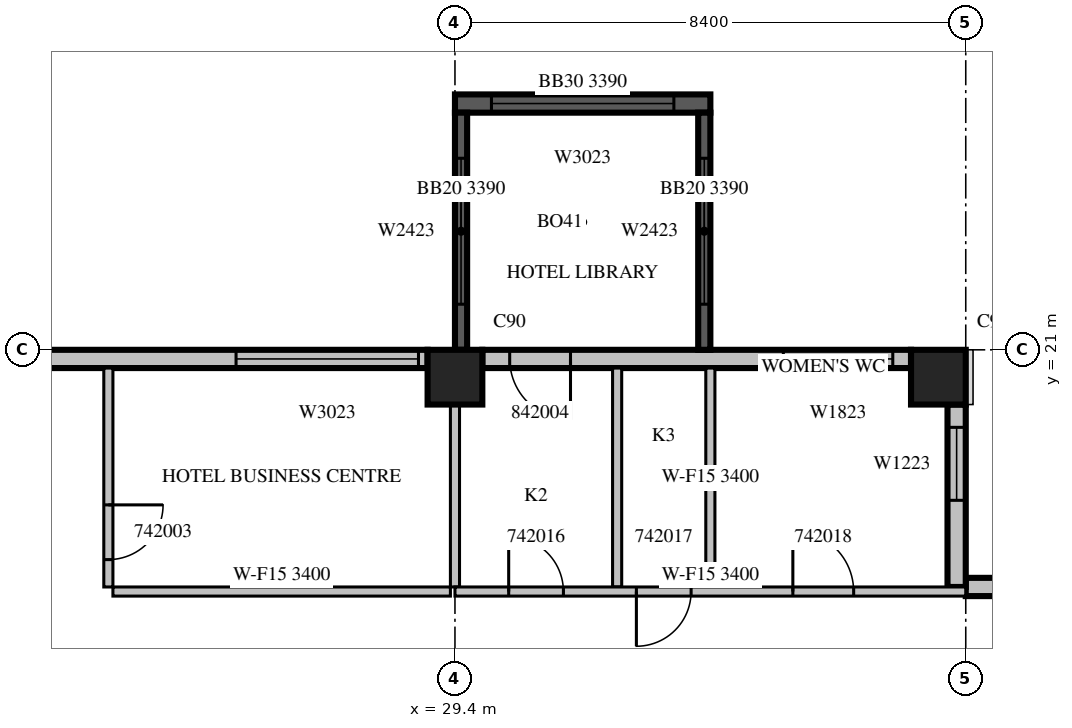
"""IFC4 building model, lengths in metres.
Left out: names, types, materials, properties, quantities, classifications, styles, units other than length and angle.
Written with IfcOpenShell. Run it as: python <this file> out.ifc"""

import sys

from ifc_helpers import new_model, si_unit, direction, frame, frame_2d, origin, origin_2d, place, context, subcontext, project, spatial, rectangle, extrude, source, transform, mapped, element, fill, save


model = new_model("IFC4")
c1 = context("Model", 3, precision=1e-05, world=origin(), true_north=direction((0.0, 1.0)))
c2 = subcontext(c1, "Body", "Model", "MODEL_VIEW")
j1 = project(units=[si_unit("LENGTHUNIT", "METRE"), si_unit("PLANEANGLEUNIT", "RADIAN")], contexts=[c1])
p1 = place(None, origin())
s1 = spatial("IfcSite", under=j1, at=p1, CompositionType="ELEMENT")
p2 = place(p1, origin())
s2 = spatial("IfcBuilding", under=s1, at=p2, CompositionType="ELEMENT")
p3 = place(p2, frame((0.0, 0.0, 193.0)))
s3 = spatial("IfcBuildingStorey", under=s2, at=p3, CompositionType="ELEMENT", Elevation=193.0)
m1 = source(origin(), c2, "Body", "SweptSolid", [
    extrude(rectangle(XDim=0.9, YDim=0.9, at=origin_2d()), origin(), (0.0, 0.0, 1.0), 3.8),
])
for number, where, z_axis, x_axis in (
    (1, (29.4, 20.55, 0.0), (0.0, 0.0, 1.0), (1.0, 0.0, 0.0)),
    (2, (37.35, 20.55, 0.0), (0.0, 0.0, 1.0), (1.0, 0.0, 0.0)),
):
    element("IfcColumn", number, at=place(p3, frame(where, z_axis=z_axis, x_axis=x_axis)), inside=s3, PredefinedType="COLUMN", context=c2, shape_type="MappedRepresentation", body=[
        mapped(m1, transform((0.0, 0.0, 0.0), scale=1.0)),
    ])
m2 = source(origin(), c2, "Body", "SweptSolid", [
    extrude(rectangle(XDim=21.84, YDim=0.3, at=frame_2d((10.92, 0.0))), origin(), (0.0, 0.0, 1.0), 3.4),
])
p4 = place(p3, frame((59.64, 17.1, 0.0), z_axis=(0.0, 0.0, 1.0), x_axis=(-1.0, 0.0, 0.0)))
e3 = element("IfcWall", 3, at=p4, inside=s3, PredefinedType="STANDARD", context=c2, shape_type="MappedRepresentation", body=[
    mapped(m2, transform((0.0, 0.0, 0.0), scale=1.0)),
])
m3 = source(origin(), c2, "Body", "SweptSolid", [
    extrude(rectangle(XDim=3.0, YDim=2.3, at=frame_2d((1.5, 1.15))), frame((0.0, 0.16, 0.0), z_axis=(0.0, -1.0, 0.0), x_axis=(1.0, 0.0, 0.0)), (0.0, 0.0, 1.0), 0.32),
])
p5 = place(p4, frame((0.6, 0.0, 0.6)))
e4 = element("IfcOpeningElement", 4, at=p5, cuts=e3, PredefinedType="OPENING", context=c2, shape_type="MappedRepresentation", body=[
    mapped(m3, transform((0.0, 0.0, 0.0), scale=1.0)),
])
p6 = place(p4, frame((4.8, 0.0, 0.6)))
e5 = element("IfcOpeningElement", 5, at=p6, cuts=e3, PredefinedType="OPENING", context=c2, shape_type="MappedRepresentation", body=[
    mapped(m3, transform((0.0, 0.0, 0.0), scale=1.0)),
])
m4 = source(origin(), c2, "Body", "SweptSolid", [
    extrude(rectangle(XDim=3.6, YDim=2.3, at=frame_2d((1.8, 1.15))), frame((0.0, 0.16, 0.0), z_axis=(0.0, -1.0, 0.0), x_axis=(1.0, 0.0, 0.0)), (0.0, 0.0, 1.0), 0.32),
])
p7 = place(p4, frame((9.54, 0.0, 0.6)))
e6 = element("IfcOpeningElement", 6, at=p7, cuts=e3, PredefinedType="OPENING", context=c2, shape_type="MappedRepresentation", body=[
    mapped(m4, transform((0.0, 0.0, 0.0), scale=1.0)),
])
p8 = place(p4, frame((15.42, 0.0, 0.6)))
e7 = element("IfcOpeningElement", 7, at=p8, cuts=e3, PredefinedType="OPENING", context=c2, shape_type="MappedRepresentation", body=[
    mapped(m4, transform((0.0, 0.0, 0.0), scale=1.0)),
])
m5 = source(origin(), c2, "Body", "SweptSolid", [
    extrude(rectangle(XDim=3.0, YDim=0.3, at=frame_2d((1.5, 0.0))), origin(), (0.0, 0.0, 1.0), 3.4),
])
p9 = place(p3, frame((37.65, 17.1, 0.0), z_axis=(0.0, 0.0, 1.0), x_axis=(0.0, 1.0, 0.0)))
e8 = element("IfcWall", 8, at=p9, inside=s3, PredefinedType="STANDARD", context=c2, shape_type="MappedRepresentation", body=[
    mapped(m5, transform((0.0, 0.0, 0.0), scale=1.0)),
])
m6 = source(origin(), c2, "Body", "SweptSolid", [
    extrude(rectangle(XDim=1.2, YDim=2.3, at=frame_2d((0.6, 1.15))), frame((0.0, 0.16, 0.0), z_axis=(0.0, -1.0, 0.0), x_axis=(1.0, 0.0, 0.0)), (0.0, 0.0, 1.0), 0.32),
])
p10 = place(p9, frame((1.425, 0.0, 0.6)))
e9 = element("IfcOpeningElement", 9, at=p10, cuts=e8, PredefinedType="OPENING", context=c2, shape_type="MappedRepresentation", body=[
    mapped(m6, transform((0.0, 0.0, 0.0), scale=1.0)),
])
m7 = source(origin(), c2, "Body", "SweptSolid", [
    extrude(rectangle(XDim=7.05, YDim=0.3, at=frame_2d((3.525, 0.0))), origin(), (0.0, 0.0, 1.0), 3.4),
])
p11 = place(p3, frame((36.9, 20.85, 0.0), z_axis=(0.0, 0.0, 1.0), x_axis=(-1.0, 0.0, 0.0)))
e10 = element("IfcWall", 10, at=p11, inside=s3, PredefinedType="STANDARD", context=c2, shape_type="MappedRepresentation", body=[
    mapped(m7, transform((0.0, 0.0, 0.0), scale=1.0)),
])
m8 = source(origin(), c2, "Body", "SweptSolid", [
    extrude(rectangle(XDim=1.8, YDim=2.3, at=frame_2d((0.9, 1.15))), frame((0.0, 0.16, 0.0), z_axis=(0.0, -1.0, 0.0), x_axis=(1.0, 0.0, 0.0)), (0.0, 0.0, 1.0), 0.32),
])
p12 = place(p11, frame((0.3, 0.0, 0.6)))
e11 = element("IfcOpeningElement", 11, at=p12, cuts=e10, PredefinedType="OPENING", context=c2, shape_type="MappedRepresentation", body=[
    mapped(m8, transform((0.0, 0.0, 0.0), scale=1.0)),
])
m9 = source(origin(), c2, "Body", "SweptSolid", [
    extrude(rectangle(XDim=1.0, YDim=2.1, at=frame_2d((0.5, 1.05))), frame((0.0, 0.16, 0.0), z_axis=(0.0, -1.0, 0.0), x_axis=(1.0, 0.0, 0.0)), (0.0, 0.0, 1.0), 0.32),
])
p13 = place(p11, frame((5.6, 0.0, 0.0)))
e12 = element("IfcOpeningElement", 12, at=p13, cuts=e10, PredefinedType="OPENING", context=c2, shape_type="MappedRepresentation", body=[
    mapped(m9, transform((0.0, 0.0, 0.0), scale=1.0)),
])
m10 = source(origin(), c2, "Body", "SweptSolid", [
    extrude(rectangle(XDim=7.15, YDim=0.3, at=frame_2d((3.575, 0.0))), origin(), (0.0, 0.0, 1.0), 3.4),
])
p14 = place(p3, frame((28.95, 20.85, 0.0), z_axis=(0.0, 0.0, 1.0), x_axis=(-1.0, 0.0, 0.0)))
e13 = element("IfcWall", 13, at=p14, inside=s3, PredefinedType="STANDARD", context=c2, shape_type="MappedRepresentation", body=[
    mapped(m10, transform((0.0, 0.0, 0.0), scale=1.0)),
])
p15 = place(p14, frame((0.15, 0.0, 0.6)))
e14 = element("IfcOpeningElement", 14, at=p15, cuts=e13, PredefinedType="OPENING", context=c2, shape_type="MappedRepresentation", body=[
    mapped(m3, transform((0.0, 0.0, 0.0), scale=1.0)),
])
m11 = source(origin(), c2, "Body", "SweptSolid", [
    extrude(rectangle(XDim=4.2, YDim=0.3, at=frame_2d((2.1, 0.0))), origin(), (0.0, 0.0, 1.0), 3.39),
])
p16 = place(p3, frame((33.6, 25.05, 0.0), z_axis=(0.0, 0.0, 1.0), x_axis=(-1.0, 0.0, 0.0)))
e15 = element("IfcWall", 15, at=p16, inside=s3, PredefinedType="SOLIDWALL", context=c2, shape_type="MappedRepresentation", body=[
    mapped(m11, transform((0.0, 0.0, 0.0), scale=1.0)),
])
p17 = place(p16, frame((0.6, 0.0, 0.6)))
e16 = element("IfcOpeningElement", 16, at=p17, cuts=e15, PredefinedType="OPENING", context=c2, shape_type="MappedRepresentation", body=[
    mapped(m3, transform((0.0, 0.0, 0.0), scale=1.0)),
])
m12 = source(origin(), c2, "Body", "SweptSolid", [
    extrude(rectangle(XDim=3.9, YDim=0.2, at=frame_2d((1.95, 0.0))), origin(), (0.0, 0.0, 1.0), 3.39),
])
p18 = place(p3, frame((33.5, 21.0, 0.0), z_axis=(0.0, 0.0, 1.0), x_axis=(0.0, 1.0, 0.0)))
e17 = element("IfcWall", 17, at=p18, inside=s3, PredefinedType="SOLIDWALL", context=c2, shape_type="MappedRepresentation", body=[
    mapped(m12, transform((0.0, 0.0, 0.0), scale=1.0)),
])
m13 = source(origin(), c2, "Body", "SweptSolid", [
    extrude(rectangle(XDim=2.4, YDim=2.3, at=frame_2d((1.2, 1.15))), frame((0.0, 0.11, 0.0), z_axis=(0.0, -1.0, 0.0), x_axis=(1.0, 0.0, 0.0)), (0.0, 0.0, 1.0), 0.22),
])
p19 = place(p18, frame((0.75, 0.0, 0.6)))
e18 = element("IfcOpeningElement", 18, at=p19, cuts=e17, PredefinedType="OPENING", context=c2, shape_type="MappedRepresentation", body=[
    mapped(m13, transform((0.0, 0.0, 0.0), scale=1.0)),
])
p20 = place(p3, frame((29.5, 21.0, 0.0), z_axis=(0.0, 0.0, 1.0), x_axis=(0.0, 1.0, 0.0)))
e19 = element("IfcWall", 19, at=p20, inside=s3, PredefinedType="SOLIDWALL", context=c2, shape_type="MappedRepresentation", body=[
    mapped(m12, transform((0.0, 0.0, 0.0), scale=1.0)),
])
p21 = place(p20, frame((0.75, 0.0, 0.6)))
e20 = element("IfcOpeningElement", 20, at=p21, cuts=e19, PredefinedType="OPENING", context=c2, shape_type="MappedRepresentation", body=[
    mapped(m13, transform((0.0, 0.0, 0.0), scale=1.0)),
])
m14 = source(origin(), c2, "Body", "SweptSolid", [
    extrude(rectangle(XDim=3.6, YDim=0.15, at=frame_2d((1.8, 0.0))), origin(), (0.0, 0.0, 1.0), 3.4),
])
p22 = place(p3, frame((23.7, 20.7, 0.0), z_axis=(0.0, 0.0, 1.0), x_axis=(0.0, -1.0, 0.0)))
e21 = element("IfcWall", 21, at=p22, inside=s3, PredefinedType="PARTITIONING", context=c2, shape_type="MappedRepresentation", body=[
    mapped(m14, transform((0.0, 0.0, 0.0), scale=1.0)),
])
m15 = source(origin(), c2, "Body", "SweptSolid", [
    extrude(rectangle(XDim=0.9, YDim=2.1, at=frame_2d((0.45, 1.05))), frame((0.0, 0.085, 0.0), z_axis=(0.0, -1.0, 0.0), x_axis=(1.0, 0.0, 0.0)), (0.0, 0.0, 1.0), 0.17),
])
p23 = place(p22, frame((2.25, 0.0, 0.0)))
e22 = element("IfcOpeningElement", 22, at=p23, cuts=e21, PredefinedType="OPENING", context=c2, shape_type="MappedRepresentation", body=[
    mapped(m15, transform((0.0, 0.0, 0.0), scale=1.0)),
])
m16 = source(origin(), c2, "Body", "SweptSolid", [
    extrude(rectangle(XDim=5.55, YDim=0.15, at=frame_2d((2.775, 0.0))), origin(), (0.0, 0.0, 1.0), 3.4),
])
p24 = place(p3, frame((23.775, 17.025, 0.0), z_axis=(0.0, 0.0, 1.0), x_axis=(1.0, 0.0, 0.0)))
e23 = element("IfcWall", 23, at=p24, inside=s3, PredefinedType="PARTITIONING", context=c2, shape_type="MappedRepresentation", body=[
    mapped(m16, transform((0.0, 0.0, 0.0), scale=1.0)),
])
m17 = source(origin(), c2, "Body", "SweptSolid", [
    extrude(rectangle(XDim=3.001, YDim=0.15, at=frame_2d((1.5, 0.0))), origin(), (0.0, 0.0, 1.0), 3.4),
])
p25 = place(p3, frame((29.4, 17.1, 0.0), z_axis=(0.0, 0.0, 1.0), x_axis=(0.0, 1.0, 0.0)))
e24 = element("IfcWall", 24, at=p25, inside=s3, PredefinedType="PARTITIONING", context=c2, shape_type="MappedRepresentation", body=[
    mapped(m17, transform((0.0, 0.0, 0.0), scale=1.0)),
])
for number, where, z_axis, x_axis in (
    (25, (32.067, 20.7, 0.0), (0.0, 0.0, 1.0), (0.0, -1.0, 0.0)),
    (26, (33.6, 17.1, 0.0), (0.0, 0.0, 1.0), (0.0, 1.0, 0.0)),
):
    element("IfcWall", number, at=place(p3, frame(where, z_axis=z_axis, x_axis=x_axis)), inside=s3, PredefinedType="PARTITIONING", context=c2, shape_type="MappedRepresentation", body=[
        mapped(m14, transform((0.0, 0.0, 0.0), scale=1.0)),
    ])
m18 = source(origin(), c2, "Body", "SweptSolid", [
    extrude(rectangle(XDim=8.4, YDim=0.15, at=frame_2d((4.2, 0.0))), origin(), (0.0, 0.0, 1.0), 3.4),
])
p26 = place(p3, frame((29.4, 17.025, 0.0), z_axis=(0.0, 0.0, 1.0), x_axis=(1.0, 0.0, 0.0)))
e27 = element("IfcWall", 27, at=p26, inside=s3, PredefinedType="PARTITIONING", context=c2, shape_type="MappedRepresentation", body=[
    mapped(m18, transform((0.0, 0.0, 0.0), scale=1.0)),
])
p27 = place(p26, frame((0.883, 0.0, 0.0)))
e28 = element("IfcOpeningElement", 28, at=p27, cuts=e27, PredefinedType="OPENING", context=c2, shape_type="MappedRepresentation", body=[
    mapped(m15, transform((0.0, 0.0, 0.0), scale=1.0)),
])
p28 = place(p26, frame((2.983, 0.0, 0.0)))
e29 = element("IfcOpeningElement", 29, at=p28, cuts=e27, PredefinedType="OPENING", context=c2, shape_type="MappedRepresentation", body=[
    mapped(m15, transform((0.0, 0.0, 0.0), scale=1.0)),
])
m19 = source(origin(), c2, "Body", "SweptSolid", [
    extrude(rectangle(XDim=1.0, YDim=2.1, at=frame_2d((0.5, 1.05))), frame((0.0, 0.085, 0.0), z_axis=(0.0, -1.0, 0.0), x_axis=(1.0, 0.0, 0.0)), (0.0, 0.0, 1.0), 0.17),
])
p29 = place(p26, frame((5.557, 0.0, 0.0)))
e30 = element("IfcOpeningElement", 30, at=p29, cuts=e27, PredefinedType="OPENING", context=c2, shape_type="MappedRepresentation", body=[
    mapped(m19, transform((0.0, 0.0, 0.0), scale=1.0)),
])
m20 = source(origin(), c2, "Body", "SweptSolid", [
    extrude(rectangle(XDim=1.2, YDim=2.3, at=frame_2d((0.6, 1.15))), frame((0.0, 0.03, 0.0), z_axis=(0.0, -1.0, 0.0), x_axis=(1.0, 0.0, 0.0)), (0.0, 0.0, 1.0), 0.06),
])
p30 = place(p10, origin())
e31 = element("IfcWindow", 31, at=p30, inside=s3, PartitioningType="SINGLE_PANEL", PredefinedType="WINDOW", context=c2, shape_type="MappedRepresentation", body=[
    mapped(m20, transform((0.0, 0.0, 0.0), scale=1.0)),
])
fill(e9, e31)
m21 = source(origin(), c2, "Body", "SweptSolid", [
    extrude(rectangle(XDim=1.8, YDim=2.3, at=frame_2d((0.9, 1.15))), frame((0.0, 0.03, 0.0), z_axis=(0.0, -1.0, 0.0), x_axis=(1.0, 0.0, 0.0)), (0.0, 0.0, 1.0), 0.06),
])
p31 = place(p12, origin())
e32 = element("IfcWindow", 32, at=p31, inside=s3, PartitioningType="SINGLE_PANEL", PredefinedType="WINDOW", context=c2, shape_type="MappedRepresentation", body=[
    mapped(m21, transform((0.0, 0.0, 0.0), scale=1.0)),
])
fill(e11, e32)
m22 = source(origin(), c2, "Body", "SweptSolid", [
    extrude(rectangle(XDim=3.0, YDim=2.3, at=frame_2d((1.5, 1.15))), frame((0.0, 0.03, 0.0), z_axis=(0.0, -1.0, 0.0), x_axis=(1.0, 0.0, 0.0)), (0.0, 0.0, 1.0), 0.06),
])
p32 = place(p15, origin())
e33 = element("IfcWindow", 33, at=p32, inside=s3, PartitioningType="SINGLE_PANEL", PredefinedType="WINDOW", context=c2, shape_type="MappedRepresentation", body=[
    mapped(m22, transform((0.0, 0.0, 0.0), scale=1.0)),
])
fill(e14, e33)
p33 = place(p17, origin())
e34 = element("IfcWindow", 34, at=p33, inside=s3, PartitioningType="SINGLE_PANEL", PredefinedType="WINDOW", context=c2, shape_type="MappedRepresentation", body=[
    mapped(m22, transform((0.0, 0.0, 0.0), scale=1.0)),
])
fill(e16, e34)
m23 = source(origin(), c2, "Body", "SweptSolid", [
    extrude(rectangle(XDim=2.4, YDim=2.3, at=frame_2d((1.2, 1.15))), frame((0.0, 0.03, 0.0), z_axis=(0.0, -1.0, 0.0), x_axis=(1.0, 0.0, 0.0)), (0.0, 0.0, 1.0), 0.06),
])
p34 = place(p19, origin())
e35 = element("IfcWindow", 35, at=p34, inside=s3, PartitioningType="SINGLE_PANEL", PredefinedType="WINDOW", context=c2, shape_type="MappedRepresentation", body=[
    mapped(m23, transform((0.0, 0.0, 0.0), scale=1.0)),
])
fill(e18, e35)
p35 = place(p21, origin())
e36 = element("IfcWindow", 36, at=p35, inside=s3, PartitioningType="SINGLE_PANEL", PredefinedType="WINDOW", context=c2, shape_type="MappedRepresentation", body=[
    mapped(m23, transform((0.0, 0.0, 0.0), scale=1.0)),
])
fill(e20, e36)
m24 = source(origin(), c2, "Body", "SweptSolid", [
    extrude(rectangle(XDim=0.9, YDim=2.1, at=frame_2d((0.45, 1.05))), frame((0.0, 0.025, 0.0), z_axis=(0.0, -1.0, 0.0), x_axis=(1.0, 0.0, 0.0)), (0.0, 0.0, 1.0), 0.05),
])
p36 = place(p23, origin())
e37 = element("IfcDoor", 37, at=p36, inside=s3, OperationType="SINGLE_SWING_LEFT", PredefinedType="DOOR", context=c2, shape_type="MappedRepresentation", body=[
    mapped(m24, transform((0.0, 0.0, 0.0), scale=1.0)),
])
fill(e22, e37)
p37 = place(p27, origin())
e38 = element("IfcDoor", 38, at=p37, inside=s3, OperationType="SINGLE_SWING_LEFT", PredefinedType="DOOR", context=c2, shape_type="MappedRepresentation", body=[
    mapped(m24, transform((0.0, 0.0, 0.0), scale=1.0)),
])
fill(e28, e38)
p38 = place(p28, origin())
e39 = element("IfcDoor", 39, at=p38, inside=s3, OperationType="SINGLE_SWING_RIGHT", PredefinedType="DOOR", context=c2, shape_type="MappedRepresentation", body=[
    mapped(m24, transform((0.0, 0.0, 0.0), scale=1.0)),
])
fill(e29, e39)
m25 = source(origin(), c2, "Body", "SweptSolid", [
    extrude(rectangle(XDim=1.0, YDim=2.1, at=frame_2d((0.5, 1.05))), frame((0.0, 0.025, 0.0), z_axis=(0.0, -1.0, 0.0), x_axis=(1.0, 0.0, 0.0)), (0.0, 0.0, 1.0), 0.05),
])
p39 = place(p29, origin())
e40 = element("IfcDoor", 40, at=p39, inside=s3, OperationType="SINGLE_SWING_LEFT", PredefinedType="DOOR", context=c2, shape_type="MappedRepresentation", body=[
    mapped(m25, transform((0.0, 0.0, 0.0), scale=1.0)),
])
fill(e30, e40)
p40 = place(p13, origin())
e41 = element("IfcDoor", 41, at=p40, inside=s3, OperationType="SINGLE_SWING_LEFT", PredefinedType="DOOR", context=c2, shape_type="MappedRepresentation", body=[
    mapped(m25, transform((0.0, 0.0, 0.0), scale=1.0)),
])
fill(e12, e41)
save(model, sys.argv[1])
